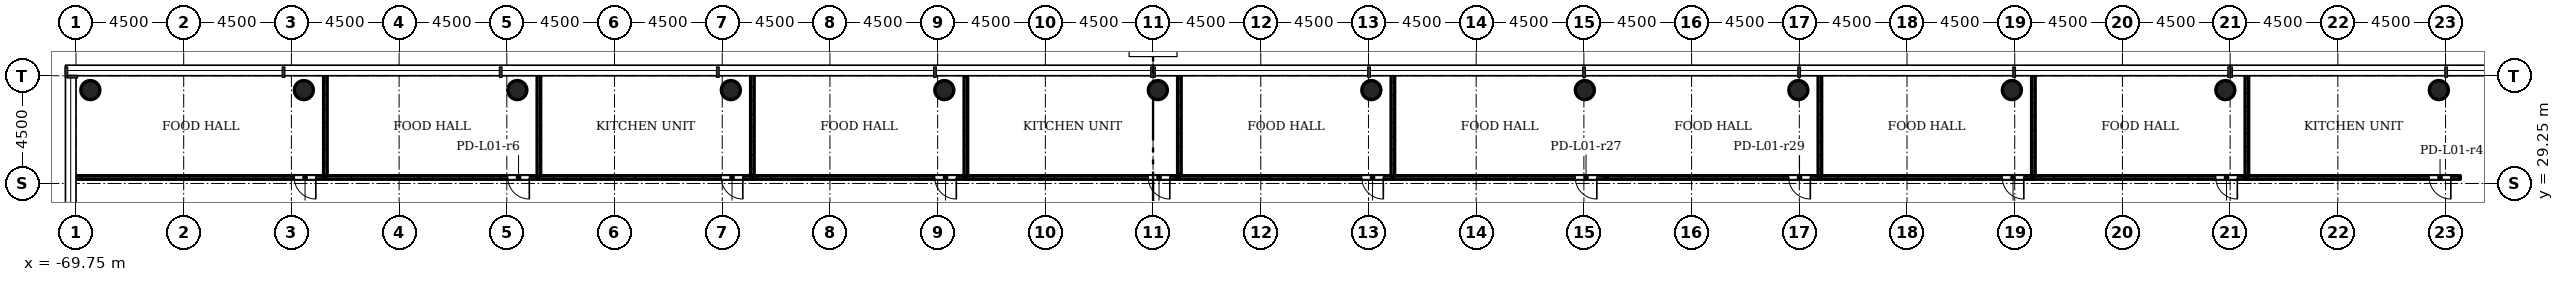
"""IFC4 building model, lengths in metres.
Left out: names, types, materials, properties, quantities, classifications, styles, units other than length and angle.
Written with IfcOpenShell. Run it as: python <this file> out.ifc"""

import sys

from ifc_helpers import new_model, si_unit, direction, frame, frame_2d, origin, origin_2d, place, context, subcontext, project, spatial, rectangle, hollow_circle, extrude, element, fill, save


model = new_model("IFC4")
c1 = context("Model", 3, precision=1e-05, world=origin(), true_north=direction((0.0, 1.0)))
c2 = subcontext(c1, "Body", "Model", "MODEL_VIEW")
j1 = project(units=[si_unit("LENGTHUNIT", "METRE"), si_unit("PLANEANGLEUNIT", "RADIAN")], contexts=[c1])
p1 = place(None, origin())
s1 = spatial("IfcSite", under=j1, at=p1, CompositionType="ELEMENT")
p2 = place(p1, origin())
s2 = spatial("IfcBuilding", under=s1, at=p2, CompositionType="ELEMENT")
p3 = place(p2, frame((0.0, 0.0, 6.0)))
s3 = spatial("IfcBuildingStorey", under=s2, at=p3, CompositionType="ELEMENT", Elevation=6.0)
for number, where, z_axis, x_axis in (
    (1, (-69.15, 33.15, 0.0), (0.0, 0.0, 1.0), (1.0, 0.0, 0.0)),
    (2, (-60.23, 33.15, 0.0), (0.0, 0.0, 1.0), (1.0, 0.0, 0.0)),
    (3, (-51.31, 33.15, 0.0), (0.0, 0.0, 1.0), (1.0, 0.0, 0.0)),
    (4, (-42.39, 33.15, 0.0), (0.0, 0.0, 1.0), (1.0, 0.0, 0.0)),
    (5, (-33.47, 33.15, 0.0), (0.0, 0.0, 1.0), (1.0, 0.0, 0.0)),
    (6, (-24.55, 33.15, 0.0), (0.0, 0.0, 1.0), (1.0, 0.0, 0.0)),
    (7, (-15.63, 33.15, 0.0), (0.0, 0.0, 1.0), (1.0, 0.0, 0.0)),
    (8, (-6.71, 33.15, 0.0), (0.0, 0.0, 1.0), (1.0, 0.0, 0.0)),
    (9, (2.21, 33.15, 0.0), (0.0, 0.0, 1.0), (1.0, 0.0, 0.0)),
    (10, (11.13, 33.15, 0.0), (0.0, 0.0, 1.0), (1.0, 0.0, 0.0)),
    (11, (20.05, 33.15, 0.0), (0.0, 0.0, 1.0), (1.0, 0.0, 0.0)),
    (12, (28.97, 33.15, 0.0), (0.0, 0.0, 1.0), (1.0, 0.0, 0.0)),
):
    element("IfcColumn", number, at=place(p3, frame(where, z_axis=z_axis, x_axis=x_axis)), inside=s3, PredefinedType="COLUMN", context=c2, shape_type="SweptSolid", body=[
        extrude(hollow_circle(Radius=0.4, WallThickness=0.028, at=origin_2d()), origin(), (0.0, 0.0, 1.0), 5.0),
    ])
p4 = place(p3, frame((-59.33, 29.5, 0.0), z_axis=(0.0, 0.0, 1.0), x_axis=(-1.0, 0.0, 0.0)))
e13 = element("IfcWall", 13, at=p4, inside=s3, PredefinedType="PARTITIONING", context=c2, shape_type="SweptSolid", body=[
    extrude(rectangle(XDim=10.52, YDim=0.15, at=frame_2d((5.26, 0.0))), origin(), (0.0, 0.0, 1.0), 4.58),
])
p5 = place(p4, frame((0.4, 0.0, 0.0)))
e14 = element("IfcOpeningElement", 14, at=p5, cuts=e13, PredefinedType="OPENING", context=c2, shape_type="SweptSolid", body=[
    extrude(rectangle(XDim=0.9, YDim=2.1, at=frame_2d((0.45, 1.05))), frame((0.0, 0.085, 0.0), z_axis=(0.0, -1.0, 0.0), x_axis=(1.0, 0.0, 0.0)), (0.0, 0.0, 1.0), 0.17),
])
p6 = place(p3, frame((-59.33, 33.85, 0.0), z_axis=(0.0, 0.0, 1.0), x_axis=(0.0, -1.0, 0.0)))
e15 = element("IfcWall", 15, at=p6, inside=s3, PredefinedType="PARTITIONING", context=c2, shape_type="SweptSolid", body=[
    extrude(rectangle(XDim=4.35, YDim=0.15, at=frame_2d((2.175, 0.0))), origin(), (0.0, 0.0, 1.0), 4.58),
])
p7 = place(p3, frame((-50.41, 29.5, 0.0), z_axis=(0.0, 0.0, 1.0), x_axis=(-1.0, 0.0, 0.0)))
e16 = element("IfcWall", 16, at=p7, inside=s3, PredefinedType="PARTITIONING", context=c2, shape_type="SweptSolid", body=[
    extrude(rectangle(XDim=8.92, YDim=0.15, at=frame_2d((4.46, 0.0))), origin(), (0.0, 0.0, 1.0), 4.58),
])
p8 = place(p7, frame((0.4, 0.0, 0.0)))
e17 = element("IfcOpeningElement", 17, at=p8, cuts=e16, PredefinedType="OPENING", context=c2, shape_type="SweptSolid", body=[
    extrude(rectangle(XDim=0.9, YDim=2.1, at=frame_2d((0.45, 1.05))), frame((0.0, 0.085, 0.0), z_axis=(0.0, -1.0, 0.0), x_axis=(1.0, 0.0, 0.0)), (0.0, 0.0, 1.0), 0.17),
])
p9 = place(p3, frame((-41.49, 29.5, 0.0), z_axis=(0.0, 0.0, 1.0), x_axis=(-1.0, 0.0, 0.0)))
e18 = element("IfcWall", 18, at=p9, inside=s3, PredefinedType="PARTITIONING", context=c2, shape_type="SweptSolid", body=[
    extrude(rectangle(XDim=8.92, YDim=0.15, at=frame_2d((4.46, 0.0))), origin(), (0.0, 0.0, 1.0), 4.58),
])
p10 = place(p9, frame((0.4, 0.0, 0.0)))
e19 = element("IfcOpeningElement", 19, at=p10, cuts=e18, PredefinedType="OPENING", context=c2, shape_type="SweptSolid", body=[
    extrude(rectangle(XDim=0.9, YDim=2.1, at=frame_2d((0.45, 1.05))), frame((0.0, 0.085, 0.0), z_axis=(0.0, -1.0, 0.0), x_axis=(1.0, 0.0, 0.0)), (0.0, 0.0, 1.0), 0.17),
])
for number, where, z_axis, x_axis in (
    (20, (-50.41, 29.5, 0.0), (0.0, 0.0, 1.0), (0.0, 1.0, 0.0)),
    (21, (-41.49, 33.85, 0.0), (0.0, 0.0, 1.0), (0.0, -1.0, 0.0)),
):
    element("IfcWall", number, at=place(p3, frame(where, z_axis=z_axis, x_axis=x_axis)), inside=s3, PredefinedType="PARTITIONING", context=c2, shape_type="SweptSolid", body=[
        extrude(rectangle(XDim=4.35, YDim=0.15, at=frame_2d((2.175, 0.0))), origin(), (0.0, 0.0, 1.0), 4.58),
    ])
p11 = place(p3, frame((-32.57, 29.5, 0.0), z_axis=(0.0, 0.0, 1.0), x_axis=(-1.0, 0.0, 0.0)))
e22 = element("IfcWall", 22, at=p11, inside=s3, PredefinedType="PARTITIONING", context=c2, shape_type="SweptSolid", body=[
    extrude(rectangle(XDim=8.92, YDim=0.15, at=frame_2d((4.46, 0.0))), origin(), (0.0, 0.0, 1.0), 4.58),
])
p12 = place(p11, frame((0.4, 0.0, 0.0)))
e23 = element("IfcOpeningElement", 23, at=p12, cuts=e22, PredefinedType="OPENING", context=c2, shape_type="SweptSolid", body=[
    extrude(rectangle(XDim=0.9, YDim=2.1, at=frame_2d((0.45, 1.05))), frame((0.0, 0.085, 0.0), z_axis=(0.0, -1.0, 0.0), x_axis=(1.0, 0.0, 0.0)), (0.0, 0.0, 1.0), 0.17),
])
p13 = place(p3, frame((-32.57, 33.85, 0.0), z_axis=(0.0, 0.0, 1.0), x_axis=(0.0, -1.0, 0.0)))
e24 = element("IfcWall", 24, at=p13, inside=s3, PredefinedType="PARTITIONING", context=c2, shape_type="SweptSolid", body=[
    extrude(rectangle(XDim=4.35, YDim=0.15, at=frame_2d((2.175, 0.0))), origin(), (0.0, 0.0, 1.0), 4.58),
])
p14 = place(p3, frame((-23.65, 29.5, 0.0), z_axis=(0.0, 0.0, 1.0), x_axis=(-1.0, 0.0, 0.0)))
e25 = element("IfcWall", 25, at=p14, inside=s3, PredefinedType="PARTITIONING", context=c2, shape_type="SweptSolid", body=[
    extrude(rectangle(XDim=8.92, YDim=0.15, at=frame_2d((4.46, 0.0))), origin(), (0.0, 0.0, 1.0), 4.58),
])
p15 = place(p14, frame((0.4, 0.0, 0.0)))
e26 = element("IfcOpeningElement", 26, at=p15, cuts=e25, PredefinedType="OPENING", context=c2, shape_type="SweptSolid", body=[
    extrude(rectangle(XDim=0.9, YDim=2.1, at=frame_2d((0.45, 1.05))), frame((0.0, 0.085, 0.0), z_axis=(0.0, -1.0, 0.0), x_axis=(1.0, 0.0, 0.0)), (0.0, 0.0, 1.0), 0.17),
])
p16 = place(p3, frame((-23.65, 33.85, 0.0), z_axis=(0.0, 0.0, 1.0), x_axis=(0.0, -1.0, 0.0)))
e27 = element("IfcWall", 27, at=p16, inside=s3, PredefinedType="PARTITIONING", context=c2, shape_type="SweptSolid", body=[
    extrude(rectangle(XDim=4.35, YDim=0.15, at=frame_2d((2.175, 0.0))), origin(), (0.0, 0.0, 1.0), 4.58),
])
p17 = place(p3, frame((-14.73, 29.5, 0.0), z_axis=(0.0, 0.0, 1.0), x_axis=(-1.0, 0.0, 0.0)))
e28 = element("IfcWall", 28, at=p17, inside=s3, PredefinedType="PARTITIONING", context=c2, shape_type="SweptSolid", body=[
    extrude(rectangle(XDim=8.92, YDim=0.15, at=frame_2d((4.46, 0.0))), origin(), (0.0, 0.0, 1.0), 4.58),
])
p18 = place(p17, frame((0.4, 0.0, 0.0)))
e29 = element("IfcOpeningElement", 29, at=p18, cuts=e28, PredefinedType="OPENING", context=c2, shape_type="SweptSolid", body=[
    extrude(rectangle(XDim=0.9, YDim=2.1, at=frame_2d((0.45, 1.05))), frame((0.0, 0.085, 0.0), z_axis=(0.0, -1.0, 0.0), x_axis=(1.0, 0.0, 0.0)), (0.0, 0.0, 1.0), 0.17),
])
p19 = place(p3, frame((-14.73, 33.85, 0.0), z_axis=(0.0, 0.0, 1.0), x_axis=(0.0, -1.0, 0.0)))
e30 = element("IfcWall", 30, at=p19, inside=s3, PredefinedType="PARTITIONING", context=c2, shape_type="SweptSolid", body=[
    extrude(rectangle(XDim=4.35, YDim=0.15, at=frame_2d((2.175, 0.0))), origin(), (0.0, 0.0, 1.0), 4.58),
])
p20 = place(p3, frame((-5.81, 29.5, 0.0), z_axis=(0.0, 0.0, 1.0), x_axis=(-1.0, 0.0, 0.0)))
e31 = element("IfcWall", 31, at=p20, inside=s3, PredefinedType="PARTITIONING", context=c2, shape_type="SweptSolid", body=[
    extrude(rectangle(XDim=8.92, YDim=0.15, at=frame_2d((4.46, 0.0))), origin(), (0.0, 0.0, 1.0), 4.58),
])
p21 = place(p20, frame((0.4, 0.0, 0.0)))
e32 = element("IfcOpeningElement", 32, at=p21, cuts=e31, PredefinedType="OPENING", context=c2, shape_type="SweptSolid", body=[
    extrude(rectangle(XDim=0.9, YDim=2.1, at=frame_2d((0.45, 1.05))), frame((0.0, 0.085, 0.0), z_axis=(0.0, -1.0, 0.0), x_axis=(1.0, 0.0, 0.0)), (0.0, 0.0, 1.0), 0.17),
])
p22 = place(p3, frame((3.11, 29.5, 0.0), z_axis=(0.0, 0.0, 1.0), x_axis=(-1.0, 0.0, 0.0)))
e33 = element("IfcWall", 33, at=p22, inside=s3, PredefinedType="PARTITIONING", context=c2, shape_type="SweptSolid", body=[
    extrude(rectangle(XDim=8.92, YDim=0.15, at=frame_2d((4.46, 0.0))), origin(), (0.0, 0.0, 1.0), 4.58),
])
p23 = place(p22, frame((0.4, 0.0, 0.0)))
e34 = element("IfcOpeningElement", 34, at=p23, cuts=e33, PredefinedType="OPENING", context=c2, shape_type="SweptSolid", body=[
    extrude(rectangle(XDim=0.9, YDim=2.1, at=frame_2d((0.45, 1.05))), frame((0.0, 0.085, 0.0), z_axis=(0.0, -1.0, 0.0), x_axis=(1.0, 0.0, 0.0)), (0.0, 0.0, 1.0), 0.17),
])
p24 = place(p3, frame((3.11, 33.85, 0.0), z_axis=(0.0, 0.0, 1.0), x_axis=(0.0, -1.0, 0.0)))
e35 = element("IfcWall", 35, at=p24, inside=s3, PredefinedType="PARTITIONING", context=c2, shape_type="SweptSolid", body=[
    extrude(rectangle(XDim=4.35, YDim=0.15, at=frame_2d((2.175, 0.0))), origin(), (0.0, 0.0, 1.0), 4.58),
])
p25 = place(p3, frame((12.03, 29.5, 0.0), z_axis=(0.0, 0.0, 1.0), x_axis=(-1.0, 0.0, 0.0)))
e36 = element("IfcWall", 36, at=p25, inside=s3, PredefinedType="PARTITIONING", context=c2, shape_type="SweptSolid", body=[
    extrude(rectangle(XDim=8.92, YDim=0.15, at=frame_2d((4.46, 0.0))), origin(), (0.0, 0.0, 1.0), 4.58),
])
p26 = place(p25, frame((0.4, 0.0, 0.0)))
e37 = element("IfcOpeningElement", 37, at=p26, cuts=e36, PredefinedType="OPENING", context=c2, shape_type="SweptSolid", body=[
    extrude(rectangle(XDim=0.9, YDim=2.1, at=frame_2d((0.45, 1.05))), frame((0.0, 0.085, 0.0), z_axis=(0.0, -1.0, 0.0), x_axis=(1.0, 0.0, 0.0)), (0.0, 0.0, 1.0), 0.17),
])
p27 = place(p3, frame((12.03, 33.85, 0.0), z_axis=(0.0, 0.0, 1.0), x_axis=(0.0, -1.0, 0.0)))
e38 = element("IfcWall", 38, at=p27, inside=s3, PredefinedType="PARTITIONING", context=c2, shape_type="SweptSolid", body=[
    extrude(rectangle(XDim=4.35, YDim=0.15, at=frame_2d((2.175, 0.0))), origin(), (0.0, 0.0, 1.0), 4.58),
])
p28 = place(p3, frame((20.95, 29.5, 0.0), z_axis=(0.0, 0.0, 1.0), x_axis=(-1.0, 0.0, 0.0)))
e39 = element("IfcWall", 39, at=p28, inside=s3, PredefinedType="PARTITIONING", context=c2, shape_type="SweptSolid", body=[
    extrude(rectangle(XDim=8.92, YDim=0.15, at=frame_2d((4.46, 0.0))), origin(), (0.0, 0.0, 1.0), 4.58),
])
p29 = place(p28, frame((0.4, 0.0, 0.0)))
e40 = element("IfcOpeningElement", 40, at=p29, cuts=e39, PredefinedType="OPENING", context=c2, shape_type="SweptSolid", body=[
    extrude(rectangle(XDim=0.9, YDim=2.1, at=frame_2d((0.45, 1.05))), frame((0.0, 0.085, 0.0), z_axis=(0.0, -1.0, 0.0), x_axis=(1.0, 0.0, 0.0)), (0.0, 0.0, 1.0), 0.17),
])
p30 = place(p3, frame((20.95, 33.85, 0.0), z_axis=(0.0, 0.0, 1.0), x_axis=(0.0, -1.0, 0.0)))
e41 = element("IfcWall", 41, at=p30, inside=s3, PredefinedType="PARTITIONING", context=c2, shape_type="SweptSolid", body=[
    extrude(rectangle(XDim=4.35, YDim=0.15, at=frame_2d((2.175, 0.0))), origin(), (0.0, 0.0, 1.0), 4.58),
])
p31 = place(p3, frame((29.87, 29.5, 0.0), z_axis=(0.0, 0.0, 1.0), x_axis=(-1.0, 0.0, 0.0)))
e42 = element("IfcWall", 42, at=p31, inside=s3, PredefinedType="PARTITIONING", context=c2, shape_type="SweptSolid", body=[
    extrude(rectangle(XDim=8.92, YDim=0.15, at=frame_2d((4.46, 0.0))), origin(), (0.0, 0.0, 1.0), 4.58),
])
p32 = place(p31, frame((0.4, 0.0, 0.0)))
e43 = element("IfcOpeningElement", 43, at=p32, cuts=e42, PredefinedType="OPENING", context=c2, shape_type="SweptSolid", body=[
    extrude(rectangle(XDim=0.9, YDim=2.1, at=frame_2d((0.45, 1.05))), frame((0.0, 0.085, 0.0), z_axis=(0.0, -1.0, 0.0), x_axis=(1.0, 0.0, 0.0)), (0.0, 0.0, 1.0), 0.17),
])
p33 = place(p5, origin())
e44 = element("IfcDoor", 44, at=p33, inside=s3, OperationType="SINGLE_SWING_RIGHT", PredefinedType="DOOR", context=c2, shape_type="SweptSolid", body=[
    extrude(rectangle(XDim=0.9, YDim=2.1, at=frame_2d((0.45, 1.05))), frame((0.0, 0.025, 0.0), z_axis=(0.0, -1.0, 0.0), x_axis=(1.0, 0.0, 0.0)), (0.0, 0.0, 1.0), 0.05),
])
fill(e14, e44)
p34 = place(p8, origin())
e45 = element("IfcDoor", 45, at=p34, inside=s3, OperationType="SINGLE_SWING_RIGHT", PredefinedType="DOOR", context=c2, shape_type="SweptSolid", body=[
    extrude(rectangle(XDim=0.9, YDim=2.1, at=frame_2d((0.45, 1.05))), frame((0.0, 0.025, 0.0), z_axis=(0.0, -1.0, 0.0), x_axis=(1.0, 0.0, 0.0)), (0.0, 0.0, 1.0), 0.05),
])
fill(e17, e45)
p35 = place(p10, origin())
e46 = element("IfcDoor", 46, at=p35, inside=s3, OperationType="SINGLE_SWING_RIGHT", PredefinedType="DOOR", context=c2, shape_type="SweptSolid", body=[
    extrude(rectangle(XDim=0.9, YDim=2.1, at=frame_2d((0.45, 1.05))), frame((0.0, 0.025, 0.0), z_axis=(0.0, -1.0, 0.0), x_axis=(1.0, 0.0, 0.0)), (0.0, 0.0, 1.0), 0.05),
])
fill(e19, e46)
p36 = place(p12, origin())
e47 = element("IfcDoor", 47, at=p36, inside=s3, OperationType="SINGLE_SWING_RIGHT", PredefinedType="DOOR", context=c2, shape_type="SweptSolid", body=[
    extrude(rectangle(XDim=0.9, YDim=2.1, at=frame_2d((0.45, 1.05))), frame((0.0, 0.025, 0.0), z_axis=(0.0, -1.0, 0.0), x_axis=(1.0, 0.0, 0.0)), (0.0, 0.0, 1.0), 0.05),
])
fill(e23, e47)
p37 = place(p15, origin())
e48 = element("IfcDoor", 48, at=p37, inside=s3, OperationType="SINGLE_SWING_RIGHT", PredefinedType="DOOR", context=c2, shape_type="SweptSolid", body=[
    extrude(rectangle(XDim=0.9, YDim=2.1, at=frame_2d((0.45, 1.05))), frame((0.0, 0.025, 0.0), z_axis=(0.0, -1.0, 0.0), x_axis=(1.0, 0.0, 0.0)), (0.0, 0.0, 1.0), 0.05),
])
fill(e26, e48)
p38 = place(p18, origin())
e49 = element("IfcDoor", 49, at=p38, inside=s3, OperationType="SINGLE_SWING_RIGHT", PredefinedType="DOOR", context=c2, shape_type="SweptSolid", body=[
    extrude(rectangle(XDim=0.9, YDim=2.1, at=frame_2d((0.45, 1.05))), frame((0.0, 0.025, 0.0), z_axis=(0.0, -1.0, 0.0), x_axis=(1.0, 0.0, 0.0)), (0.0, 0.0, 1.0), 0.05),
])
fill(e29, e49)
p39 = place(p21, origin())
e50 = element("IfcDoor", 50, at=p39, inside=s3, OperationType="SINGLE_SWING_RIGHT", PredefinedType="DOOR", context=c2, shape_type="SweptSolid", body=[
    extrude(rectangle(XDim=0.9, YDim=2.1, at=frame_2d((0.45, 1.05))), frame((0.0, 0.025, 0.0), z_axis=(0.0, -1.0, 0.0), x_axis=(1.0, 0.0, 0.0)), (0.0, 0.0, 1.0), 0.05),
])
fill(e32, e50)
p40 = place(p23, origin())
e51 = element("IfcDoor", 51, at=p40, inside=s3, OperationType="SINGLE_SWING_RIGHT", PredefinedType="DOOR", context=c2, shape_type="SweptSolid", body=[
    extrude(rectangle(XDim=0.9, YDim=2.1, at=frame_2d((0.45, 1.05))), frame((0.0, 0.025, 0.0), z_axis=(0.0, -1.0, 0.0), x_axis=(1.0, 0.0, 0.0)), (0.0, 0.0, 1.0), 0.05),
])
fill(e34, e51)
p41 = place(p26, origin())
e52 = element("IfcDoor", 52, at=p41, inside=s3, OperationType="SINGLE_SWING_RIGHT", PredefinedType="DOOR", context=c2, shape_type="SweptSolid", body=[
    extrude(rectangle(XDim=0.9, YDim=2.1, at=frame_2d((0.45, 1.05))), frame((0.0, 0.025, 0.0), z_axis=(0.0, -1.0, 0.0), x_axis=(1.0, 0.0, 0.0)), (0.0, 0.0, 1.0), 0.05),
])
fill(e37, e52)
p42 = place(p29, origin())
e53 = element("IfcDoor", 53, at=p42, inside=s3, OperationType="SINGLE_SWING_RIGHT", PredefinedType="DOOR", context=c2, shape_type="SweptSolid", body=[
    extrude(rectangle(XDim=0.9, YDim=2.1, at=frame_2d((0.45, 1.05))), frame((0.0, 0.025, 0.0), z_axis=(0.0, -1.0, 0.0), x_axis=(1.0, 0.0, 0.0)), (0.0, 0.0, 1.0), 0.05),
])
fill(e40, e53)
p43 = place(p32, origin())
e54 = element("IfcDoor", 54, at=p43, inside=s3, OperationType="SINGLE_SWING_RIGHT", PredefinedType="DOOR", context=c2, shape_type="SweptSolid", body=[
    extrude(rectangle(XDim=0.9, YDim=2.1, at=frame_2d((0.45, 1.05))), frame((0.0, 0.025, 0.0), z_axis=(0.0, -1.0, 0.0), x_axis=(1.0, 0.0, 0.0)), (0.0, 0.0, 1.0), 0.05),
])
fill(e43, e54)
save(model, sys.argv[1])
